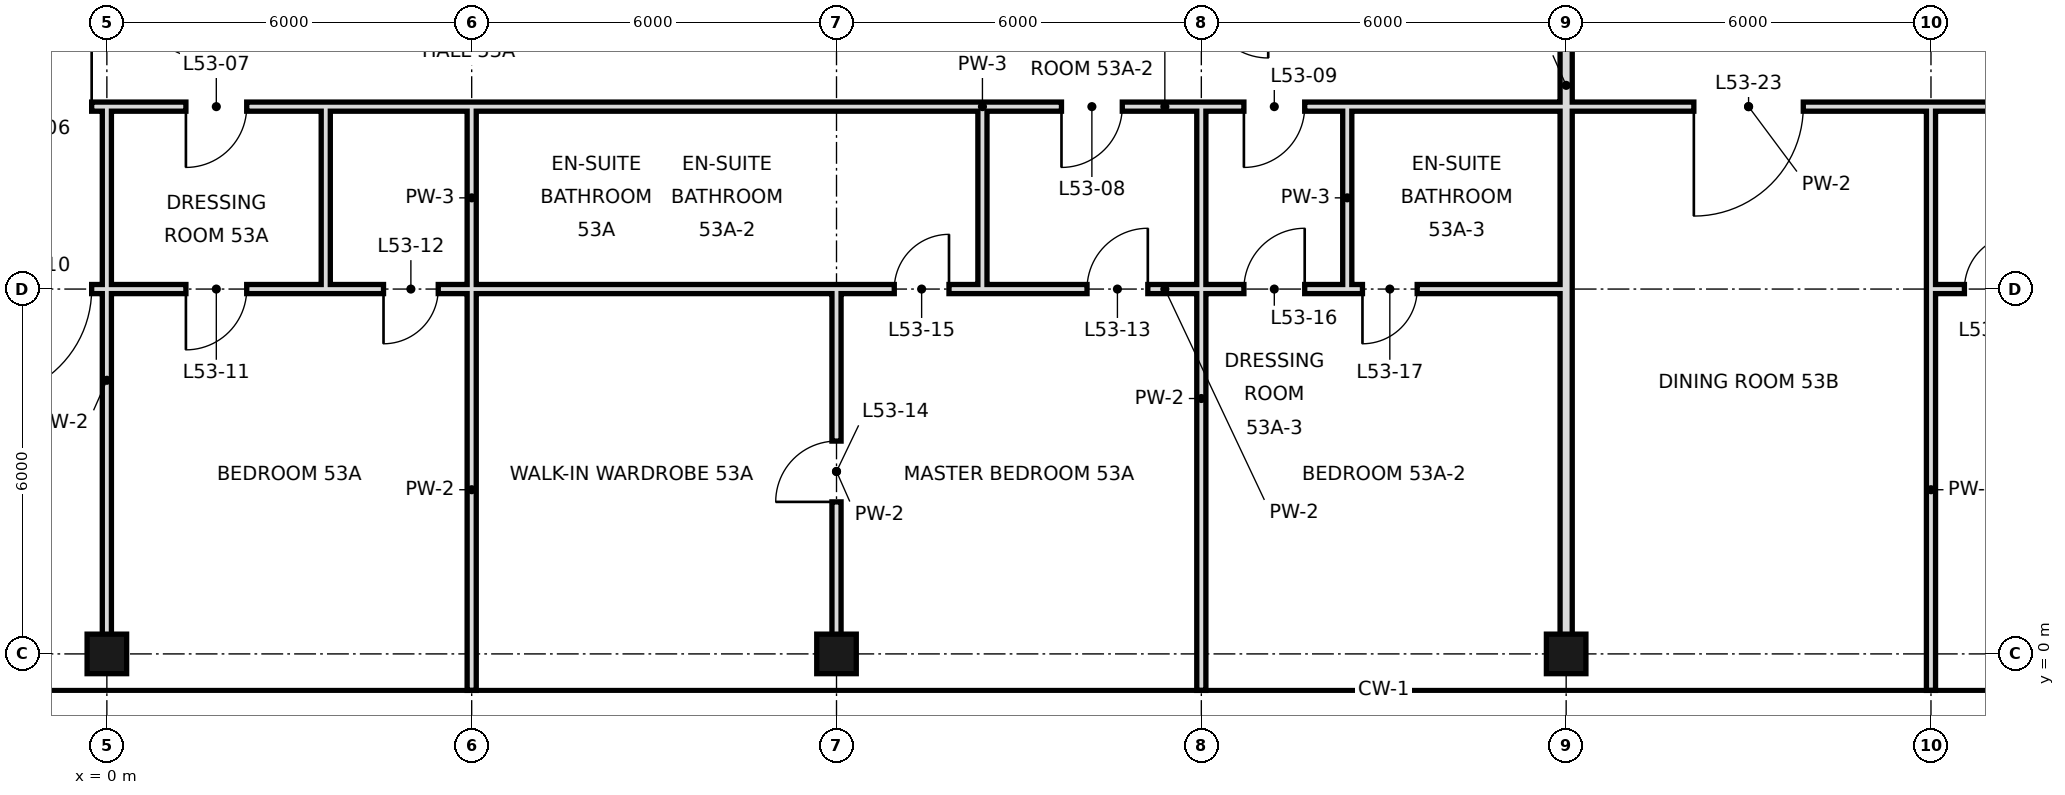
"""IFC4 building model, lengths in metres.
Left out: names, types, materials, properties, quantities, classifications, styles, units other than length and angle.
Written with IfcOpenShell. Run it as: python <this file> out.ifc"""

import sys

from ifc_helpers import new_model, si_unit, direction, frame, frame_2d, origin, origin_2d, place, context, subcontext, project, spatial, rectangle, hollow_rectangle, extrude, element, fill, save


model = new_model("IFC4")
c1 = context("Model", 3, precision=1e-05, world=origin(), true_north=direction((0.0, 1.0)))
c2 = subcontext(c1, "Body", "Model", "MODEL_VIEW")
j1 = project(units=[si_unit("LENGTHUNIT", "METRE"), si_unit("PLANEANGLEUNIT", "RADIAN")], contexts=[c1])
p1 = place(None, origin())
s1 = spatial("IfcSite", under=j1, at=p1, CompositionType="ELEMENT")
p2 = place(p1, origin())
s2 = spatial("IfcBuilding", under=s1, at=p2, CompositionType="ELEMENT")
p3 = place(p2, frame((0.0, 0.0, 226.2)))
s3 = spatial("IfcBuildingStorey", under=s2, at=p3, CompositionType="ELEMENT", Elevation=226.2)
for number, where, z_axis, x_axis in (
    (1, (0.0, 0.0, 0.0), (0.0, 0.0, 1.0), (1.0, 0.0, 0.0)),
    (2, (12.0, 0.0, 0.0), (0.0, 0.0, 1.0), (1.0, 0.0, 0.0)),
    (3, (24.0, 0.0, 0.0), (0.0, 0.0, 1.0), (1.0, 0.0, 0.0)),
):
    element("IfcColumn", number, at=place(p3, frame(where, z_axis=z_axis, x_axis=x_axis)), inside=s3, PredefinedType="COLUMN", context=c2, shape_type="SweptSolid", body=[
        extrude(hollow_rectangle(XDim=0.65, YDim=0.65, WallThickness=0.032, at=origin_2d()), origin(), (0.0, 0.0, 1.0), 3.6),
    ])
p4 = place(p3, frame((0.0, 0.0, 0.0), z_axis=(0.0, 0.0, 1.0), x_axis=(0.0, 1.0, 0.0)))
e4 = element("IfcWall", 4, at=p4, inside=s3, PredefinedType="PARTITIONING", context=c2, shape_type="SweptSolid", body=[
    extrude(rectangle(XDim=9.0, YDim=0.15, at=frame_2d((4.5, 0.0))), origin(), (0.0, 0.0, 1.0), 2.72),
])
p5 = place(p3, frame((12.0, 0.0, 0.0), z_axis=(0.0, 0.0, 1.0), x_axis=(0.0, 1.0, 0.0)))
e5 = element("IfcWall", 5, at=p5, inside=s3, PredefinedType="PARTITIONING", context=c2, shape_type="SweptSolid", body=[
    extrude(rectangle(XDim=6.0, YDim=0.15, at=frame_2d((3.0, 0.0))), origin(), (0.0, 0.0, 1.0), 2.72),
])
p6 = place(p5, frame((2.5, 0.0, 0.0)))
e6 = element("IfcOpeningElement", 6, at=p6, cuts=e5, PredefinedType="OPENING", context=c2, shape_type="SweptSolid", body=[
    extrude(rectangle(XDim=1.0, YDim=2.4, at=frame_2d((0.5, 1.2))), frame((0.0, 0.085, 0.0), z_axis=(0.0, -1.0, 0.0), x_axis=(1.0, 0.0, 0.0)), (0.0, 0.0, 1.0), 0.17),
])
p7 = place(p3, frame((14.4, 6.0, 0.0), z_axis=(0.0, 0.0, 1.0), x_axis=(0.0, 1.0, 0.0)))
e7 = element("IfcWall", 7, at=p7, inside=s3, PredefinedType="PARTITIONING", context=c2, shape_type="SweptSolid", body=[
    extrude(rectangle(XDim=3.0, YDim=0.15, at=frame_2d((1.5, 0.0))), origin(), (0.0, 0.0, 1.0), 3.42),
])
p8 = place(p3, frame((18.0, -0.6, 0.0), z_axis=(0.0, 0.0, 1.0), x_axis=(0.0, 1.0, 0.0)))
e8 = element("IfcWall", 8, at=p8, inside=s3, PredefinedType="PARTITIONING", context=c2, shape_type="SweptSolid", body=[
    extrude(rectangle(XDim=9.6, YDim=0.15, at=frame_2d((4.8, 0.0))), origin(), (0.0, 0.0, 1.0), 2.72),
])
p9 = place(p3, frame((20.4, 6.0, 0.0), z_axis=(0.0, 0.0, 1.0), x_axis=(0.0, 1.0, 0.0)))
e9 = element("IfcWall", 9, at=p9, inside=s3, PredefinedType="PARTITIONING", context=c2, shape_type="SweptSolid", body=[
    extrude(rectangle(XDim=3.0, YDim=0.15, at=frame_2d((1.5, 0.0))), origin(), (0.0, 0.0, 1.0), 3.42),
])
p10 = place(p3, frame((24.0, 0.0, 0.0), z_axis=(0.0, 0.0, 1.0), x_axis=(0.0, 1.0, 0.0)))
e10 = element("IfcWall", 10, at=p10, inside=s3, PredefinedType="SOLIDWALL", context=c2, shape_type="SweptSolid", body=[
    extrude(rectangle(XDim=18.7, YDim=0.2, at=frame_2d((9.35, 0.0))), origin(), (0.0, 0.0, 1.0), 2.72),
])
p11 = place(p3, frame((3.6, 6.0, 0.0), z_axis=(0.0, 0.0, 1.0), x_axis=(0.0, 1.0, 0.0)))
e11 = element("IfcWall", 11, at=p11, inside=s3, PredefinedType="PARTITIONING", context=c2, shape_type="SweptSolid", body=[
    extrude(rectangle(XDim=3.0, YDim=0.15, at=frame_2d((1.5, 0.0))), origin(), (0.0, 0.0, 1.0), 3.42),
])
p12 = place(p3, frame((30.0, -0.6, 0.0), z_axis=(0.0, 0.0, 1.0), x_axis=(0.0, 1.0, 0.0)))
e12 = element("IfcWall", 12, at=p12, inside=s3, PredefinedType="PARTITIONING", context=c2, shape_type="SweptSolid", body=[
    extrude(rectangle(XDim=6.6, YDim=0.15, at=frame_2d((3.3, 0.0))), origin(), (0.0, 0.0, 1.0), 2.72),
])
p13 = place(p3, frame((30.0, 6.0, 0.0), z_axis=(0.0, 0.0, 1.0), x_axis=(0.0, 1.0, 0.0)))
e13 = element("IfcWall", 13, at=p13, inside=s3, PredefinedType="PARTITIONING", context=c2, shape_type="SweptSolid", body=[
    extrude(rectangle(XDim=3.0, YDim=0.15, at=frame_2d((1.5, 0.0))), origin(), (0.0, 0.0, 1.0), 2.72),
])
p14 = place(p3, frame((6.0, -0.6, 0.0), z_axis=(0.0, 0.0, 1.0), x_axis=(0.0, 1.0, 0.0)))
e14 = element("IfcWall", 14, at=p14, inside=s3, PredefinedType="PARTITIONING", context=c2, shape_type="SweptSolid", body=[
    extrude(rectangle(XDim=6.6, YDim=0.15, at=frame_2d((3.3, 0.0))), origin(), (0.0, 0.0, 1.0), 2.72),
])
p15 = place(p3, frame((6.0, 6.0, 0.0), z_axis=(0.0, 0.0, 1.0), x_axis=(0.0, 1.0, 0.0)))
e15 = element("IfcWall", 15, at=p15, inside=s3, PredefinedType="PARTITIONING", context=c2, shape_type="SweptSolid", body=[
    extrude(rectangle(XDim=3.0, YDim=0.15, at=frame_2d((1.5, 0.0))), origin(), (0.0, 0.0, 1.0), 2.72),
])
p16 = place(p3, frame((-12.0, 6.0, 0.0), z_axis=(0.0, 0.0, 1.0), x_axis=(1.0, 0.0, 0.0)))
e16 = element("IfcWall", 16, at=p16, inside=s3, PredefinedType="PARTITIONING", context=c2, shape_type="SweptSolid", body=[
    extrude(rectangle(XDim=15.6, YDim=0.15, at=frame_2d((7.8, 0.0))), origin(), (0.0, 0.0, 1.0), 2.72),
])
p17 = place(p16, frame((9.95, 0.0, 0.0)))
e17 = element("IfcOpeningElement", 17, at=p17, cuts=e16, PredefinedType="OPENING", context=c2, shape_type="SweptSolid", body=[
    extrude(rectangle(XDim=1.8, YDim=2.4, at=frame_2d((0.9, 1.2))), frame((0.0, 0.085, 0.0), z_axis=(0.0, -1.0, 0.0), x_axis=(1.0, 0.0, 0.0)), (0.0, 0.0, 1.0), 0.17),
])
p18 = place(p16, frame((13.3, 0.0, 0.0)))
e18 = element("IfcOpeningElement", 18, at=p18, cuts=e16, PredefinedType="OPENING", context=c2, shape_type="SweptSolid", body=[
    extrude(rectangle(XDim=1.0, YDim=2.4, at=frame_2d((0.5, 1.2))), frame((0.0, 0.085, 0.0), z_axis=(0.0, -1.0, 0.0), x_axis=(1.0, 0.0, 0.0)), (0.0, 0.0, 1.0), 0.17),
])
p19 = place(p3, frame((14.4, 6.0, 0.0), z_axis=(0.0, 0.0, 1.0), x_axis=(1.0, 0.0, 0.0)))
e19 = element("IfcWall", 19, at=p19, inside=s3, PredefinedType="PARTITIONING", context=c2, shape_type="SweptSolid", body=[
    extrude(rectangle(XDim=6.0, YDim=0.15, at=frame_2d((3.0, 0.0))), origin(), (0.0, 0.0, 1.0), 2.97),
])
p20 = place(p19, frame((1.72, 0.0, 0.0)))
e20 = element("IfcOpeningElement", 20, at=p20, cuts=e19, PredefinedType="OPENING", context=c2, shape_type="SweptSolid", body=[
    extrude(rectangle(XDim=1.0, YDim=2.4, at=frame_2d((0.5, 1.2))), frame((0.0, 0.085, 0.0), z_axis=(0.0, -1.0, 0.0), x_axis=(1.0, 0.0, 0.0)), (0.0, 0.0, 1.0), 0.17),
])
p21 = place(p19, frame((4.3, 0.0, 0.0)))
e21 = element("IfcOpeningElement", 21, at=p21, cuts=e19, PredefinedType="OPENING", context=c2, shape_type="SweptSolid", body=[
    extrude(rectangle(XDim=1.0, YDim=2.4, at=frame_2d((0.5, 1.2))), frame((0.0, 0.085, 0.0), z_axis=(0.0, -1.0, 0.0), x_axis=(1.0, 0.0, 0.0)), (0.0, 0.0, 1.0), 0.17),
])
p22 = place(p3, frame((3.6, 6.0, 0.0), z_axis=(0.0, 0.0, 1.0), x_axis=(1.0, 0.0, 0.0)))
e22 = element("IfcWall", 22, at=p22, inside=s3, PredefinedType="PARTITIONING", context=c2, shape_type="SweptSolid", body=[
    extrude(rectangle(XDim=10.8, YDim=0.15, at=frame_2d((5.4, 0.0))), origin(), (0.0, 0.0, 1.0), 2.97),
])
p23 = place(p22, frame((0.95, 0.0, 0.0)))
e23 = element("IfcOpeningElement", 23, at=p23, cuts=e22, PredefinedType="OPENING", context=c2, shape_type="SweptSolid", body=[
    extrude(rectangle(XDim=0.9, YDim=2.4, at=frame_2d((0.45, 1.2))), frame((0.0, 0.085, 0.0), z_axis=(0.0, -1.0, 0.0), x_axis=(1.0, 0.0, 0.0)), (0.0, 0.0, 1.0), 0.17),
])
p24 = place(p22, frame((9.35, 0.0, 0.0)))
e24 = element("IfcOpeningElement", 24, at=p24, cuts=e22, PredefinedType="OPENING", context=c2, shape_type="SweptSolid", body=[
    extrude(rectangle(XDim=0.9, YDim=2.4, at=frame_2d((0.45, 1.2))), frame((0.0, 0.085, 0.0), z_axis=(0.0, -1.0, 0.0), x_axis=(1.0, 0.0, 0.0)), (0.0, 0.0, 1.0), 0.17),
])
p25 = place(p3, frame((20.4, 6.0, 0.0), z_axis=(0.0, 0.0, 1.0), x_axis=(1.0, 0.0, 0.0)))
e25 = element("IfcWall", 25, at=p25, inside=s3, PredefinedType="PARTITIONING", context=c2, shape_type="SweptSolid", body=[
    extrude(rectangle(XDim=3.6, YDim=0.15, at=frame_2d((1.8, 0.0))), origin(), (0.0, 0.0, 1.0), 2.97),
])
p26 = place(p25, frame((0.25, 0.0, 0.0)))
e26 = element("IfcOpeningElement", 26, at=p26, cuts=e25, PredefinedType="OPENING", context=c2, shape_type="SweptSolid", body=[
    extrude(rectangle(XDim=0.9, YDim=2.4, at=frame_2d((0.45, 1.2))), frame((0.0, 0.085, 0.0), z_axis=(0.0, -1.0, 0.0), x_axis=(1.0, 0.0, 0.0)), (0.0, 0.0, 1.0), 0.17),
])
p27 = place(p3, frame((30.0, 6.0, 0.0), z_axis=(0.0, 0.0, 1.0), x_axis=(1.0, 0.0, 0.0)))
e27 = element("IfcWall", 27, at=p27, inside=s3, PredefinedType="PARTITIONING", context=c2, shape_type="SweptSolid", body=[
    extrude(rectangle(XDim=2.4, YDim=0.15, at=frame_2d((1.2, 0.0))), origin(), (0.0, 0.0, 1.0), 2.97),
])
p28 = place(p27, frame((0.55, 0.0, 0.0)))
e28 = element("IfcOpeningElement", 28, at=p28, cuts=e27, PredefinedType="OPENING", context=c2, shape_type="SweptSolid", body=[
    extrude(rectangle(XDim=0.9, YDim=2.4, at=frame_2d((0.45, 1.2))), frame((0.0, 0.085, 0.0), z_axis=(0.0, -1.0, 0.0), x_axis=(1.0, 0.0, 0.0)), (0.0, 0.0, 1.0), 0.17),
])
p29 = place(p3, frame((-12.6, 9.0, 0.0), z_axis=(0.0, 0.0, 1.0), x_axis=(1.0, 0.0, 0.0)))
e29 = element("IfcWall", 29, at=p29, inside=s3, PredefinedType="PARTITIONING", context=c2, shape_type="SweptSolid", body=[
    extrude(rectangle(XDim=16.2, YDim=0.15, at=frame_2d((8.1, 0.0))), origin(), (0.0, 0.0, 1.0), 3.42),
])
p30 = place(p29, frame((10.55, 0.0, 0.0)))
e30 = element("IfcOpeningElement", 30, at=p30, cuts=e29, PredefinedType="OPENING", context=c2, shape_type="SweptSolid", body=[
    extrude(rectangle(XDim=1.8, YDim=2.4, at=frame_2d((0.9, 1.2))), frame((0.0, 0.085, 0.0), z_axis=(0.0, -1.0, 0.0), x_axis=(1.0, 0.0, 0.0)), (0.0, 0.0, 1.0), 0.17),
])
p31 = place(p29, frame((13.9, 0.0, 0.0)))
e31 = element("IfcOpeningElement", 31, at=p31, cuts=e29, PredefinedType="OPENING", context=c2, shape_type="SweptSolid", body=[
    extrude(rectangle(XDim=1.0, YDim=2.4, at=frame_2d((0.5, 1.2))), frame((0.0, 0.085, 0.0), z_axis=(0.0, -1.0, 0.0), x_axis=(1.0, 0.0, 0.0)), (0.0, 0.0, 1.0), 0.17),
])
p32 = place(p3, frame((14.4, 9.0, 0.0), z_axis=(0.0, 0.0, 1.0), x_axis=(1.0, 0.0, 0.0)))
e32 = element("IfcWall", 32, at=p32, inside=s3, PredefinedType="PARTITIONING", context=c2, shape_type="SweptSolid", body=[
    extrude(rectangle(XDim=6.0, YDim=0.15, at=frame_2d((3.0, 0.0))), origin(), (0.0, 0.0, 1.0), 3.42),
])
p33 = place(p32, frame((1.3, 0.0, 0.0)))
e33 = element("IfcOpeningElement", 33, at=p33, cuts=e32, PredefinedType="OPENING", context=c2, shape_type="SweptSolid", body=[
    extrude(rectangle(XDim=1.0, YDim=2.4, at=frame_2d((0.5, 1.2))), frame((0.0, 0.085, 0.0), z_axis=(0.0, -1.0, 0.0), x_axis=(1.0, 0.0, 0.0)), (0.0, 0.0, 1.0), 0.17),
])
p34 = place(p32, frame((4.3, 0.0, 0.0)))
e34 = element("IfcOpeningElement", 34, at=p34, cuts=e32, PredefinedType="OPENING", context=c2, shape_type="SweptSolid", body=[
    extrude(rectangle(XDim=1.0, YDim=2.4, at=frame_2d((0.5, 1.2))), frame((0.0, 0.085, 0.0), z_axis=(0.0, -1.0, 0.0), x_axis=(1.0, 0.0, 0.0)), (0.0, 0.0, 1.0), 0.17),
])
p35 = place(p3, frame((24.0, 9.0, 0.0), z_axis=(0.0, 0.0, 1.0), x_axis=(1.0, 0.0, 0.0)))
e35 = element("IfcWall", 35, at=p35, inside=s3, PredefinedType="PARTITIONING", context=c2, shape_type="SweptSolid", body=[
    extrude(rectangle(XDim=6.0, YDim=0.15, at=frame_2d((3.0, 0.0))), origin(), (0.0, 0.0, 1.0), 3.42),
])
p36 = place(p35, frame((2.1, 0.0, 0.0)))
e36 = element("IfcOpeningElement", 36, at=p36, cuts=e35, PredefinedType="OPENING", context=c2, shape_type="SweptSolid", body=[
    extrude(rectangle(XDim=1.8, YDim=2.4, at=frame_2d((0.9, 1.2))), frame((0.0, 0.085, 0.0), z_axis=(0.0, -1.0, 0.0), x_axis=(1.0, 0.0, 0.0)), (0.0, 0.0, 1.0), 0.17),
])
p37 = place(p3, frame((3.6, 9.0, 0.0), z_axis=(0.0, 0.0, 1.0), x_axis=(1.0, 0.0, 0.0)))
e37 = element("IfcWall", 37, at=p37, inside=s3, PredefinedType="PARTITIONING", context=c2, shape_type="SweptSolid", body=[
    extrude(rectangle(XDim=10.8, YDim=0.15, at=frame_2d((5.4, 0.0))), origin(), (0.0, 0.0, 1.0), 3.42),
])
p38 = place(p3, frame((20.4, 9.0, 0.0), z_axis=(0.0, 0.0, 1.0), x_axis=(1.0, 0.0, 0.0)))
e38 = element("IfcWall", 38, at=p38, inside=s3, PredefinedType="PARTITIONING", context=c2, shape_type="SweptSolid", body=[
    extrude(rectangle(XDim=3.6, YDim=0.15, at=frame_2d((1.8, 0.0))), origin(), (0.0, 0.0, 1.0), 3.42),
])
p39 = place(p3, frame((30.0, 9.0, 0.0), z_axis=(0.0, 0.0, 1.0), x_axis=(1.0, 0.0, 0.0)))
e39 = element("IfcWall", 39, at=p39, inside=s3, PredefinedType="PARTITIONING", context=c2, shape_type="SweptSolid", body=[
    extrude(rectangle(XDim=2.4, YDim=0.15, at=frame_2d((1.2, 0.0))), origin(), (0.0, 0.0, 1.0), 3.42),
])
p40 = place(p30, frame((1.8, 0.0, 0.0), z_axis=(0.0, 0.0, 1.0), x_axis=(-1.0, 0.0, 0.0)))
e40 = element("IfcDoor", 40, at=p40, inside=s3, OperationType="SINGLE_SWING_LEFT", PredefinedType="DOOR", context=c2, shape_type="SweptSolid", body=[
    extrude(rectangle(XDim=1.8, YDim=2.4, at=frame_2d((0.9, 1.2))), frame((0.0, 0.025, 0.0), z_axis=(0.0, -1.0, 0.0), x_axis=(1.0, 0.0, 0.0)), (0.0, 0.0, 1.0), 0.05),
])
fill(e30, e40)
p41 = place(p31, frame((1.0, 0.0, 0.0), z_axis=(0.0, 0.0, 1.0), x_axis=(-1.0, 0.0, 0.0)))
e41 = element("IfcDoor", 41, at=p41, inside=s3, OperationType="SINGLE_SWING_RIGHT", PredefinedType="DOOR", context=c2, shape_type="SweptSolid", body=[
    extrude(rectangle(XDim=1.0, YDim=2.4, at=frame_2d((0.5, 1.2))), frame((0.0, 0.025, 0.0), z_axis=(0.0, -1.0, 0.0), x_axis=(1.0, 0.0, 0.0)), (0.0, 0.0, 1.0), 0.05),
])
fill(e31, e41)
p42 = place(p33, frame((1.0, 0.0, 0.0), z_axis=(0.0, 0.0, 1.0), x_axis=(-1.0, 0.0, 0.0)))
e42 = element("IfcDoor", 42, at=p42, inside=s3, OperationType="SINGLE_SWING_RIGHT", PredefinedType="DOOR", context=c2, shape_type="SweptSolid", body=[
    extrude(rectangle(XDim=1.0, YDim=2.4, at=frame_2d((0.5, 1.2))), frame((0.0, 0.025, 0.0), z_axis=(0.0, -1.0, 0.0), x_axis=(1.0, 0.0, 0.0)), (0.0, 0.0, 1.0), 0.05),
])
fill(e33, e42)
p43 = place(p34, frame((1.0, 0.0, 0.0), z_axis=(0.0, 0.0, 1.0), x_axis=(-1.0, 0.0, 0.0)))
e43 = element("IfcDoor", 43, at=p43, inside=s3, OperationType="SINGLE_SWING_RIGHT", PredefinedType="DOOR", context=c2, shape_type="SweptSolid", body=[
    extrude(rectangle(XDim=1.0, YDim=2.4, at=frame_2d((0.5, 1.2))), frame((0.0, 0.025, 0.0), z_axis=(0.0, -1.0, 0.0), x_axis=(1.0, 0.0, 0.0)), (0.0, 0.0, 1.0), 0.05),
])
fill(e34, e43)
p44 = place(p17, frame((1.8, 0.0, 0.0), z_axis=(0.0, 0.0, 1.0), x_axis=(-1.0, 0.0, 0.0)))
e44 = element("IfcDoor", 44, at=p44, inside=s3, OperationType="SINGLE_SWING_RIGHT", PredefinedType="DOOR", context=c2, shape_type="SweptSolid", body=[
    extrude(rectangle(XDim=1.8, YDim=2.4, at=frame_2d((0.9, 1.2))), frame((0.0, 0.025, 0.0), z_axis=(0.0, -1.0, 0.0), x_axis=(1.0, 0.0, 0.0)), (0.0, 0.0, 1.0), 0.05),
])
fill(e17, e44)
p45 = place(p18, frame((1.0, 0.0, 0.0), z_axis=(0.0, 0.0, 1.0), x_axis=(-1.0, 0.0, 0.0)))
e45 = element("IfcDoor", 45, at=p45, inside=s3, OperationType="SINGLE_SWING_RIGHT", PredefinedType="DOOR", context=c2, shape_type="SweptSolid", body=[
    extrude(rectangle(XDim=1.0, YDim=2.4, at=frame_2d((0.5, 1.2))), frame((0.0, 0.025, 0.0), z_axis=(0.0, -1.0, 0.0), x_axis=(1.0, 0.0, 0.0)), (0.0, 0.0, 1.0), 0.05),
])
fill(e18, e45)
p46 = place(p23, frame((0.9, 0.0, 0.0), z_axis=(0.0, 0.0, 1.0), x_axis=(-1.0, 0.0, 0.0)))
e46 = element("IfcDoor", 46, at=p46, inside=s3, OperationType="SINGLE_SWING_RIGHT", PredefinedType="DOOR", context=c2, shape_type="SweptSolid", body=[
    extrude(rectangle(XDim=0.9, YDim=2.4, at=frame_2d((0.45, 1.2))), frame((0.0, 0.025, 0.0), z_axis=(0.0, -1.0, 0.0), x_axis=(1.0, 0.0, 0.0)), (0.0, 0.0, 1.0), 0.05),
])
fill(e23, e46)
p47 = place(p20, frame((1.0, 0.0, 0.0), z_axis=(0.0, 0.0, 1.0), x_axis=(-1.0, 0.0, 0.0)))
e47 = element("IfcDoor", 47, at=p47, inside=s3, OperationType="SINGLE_SWING_LEFT", PredefinedType="DOOR", context=c2, shape_type="SweptSolid", body=[
    extrude(rectangle(XDim=1.0, YDim=2.4, at=frame_2d((0.5, 1.2))), frame((0.0, 0.025, 0.0), z_axis=(0.0, -1.0, 0.0), x_axis=(1.0, 0.0, 0.0)), (0.0, 0.0, 1.0), 0.05),
])
fill(e20, e47)
p48 = place(p6, origin())
e48 = element("IfcDoor", 48, at=p48, inside=s3, OperationType="SINGLE_SWING_LEFT", PredefinedType="DOOR", context=c2, shape_type="SweptSolid", body=[
    extrude(rectangle(XDim=1.0, YDim=2.4, at=frame_2d((0.5, 1.2))), frame((0.0, 0.025, 0.0), z_axis=(0.0, -1.0, 0.0), x_axis=(1.0, 0.0, 0.0)), (0.0, 0.0, 1.0), 0.05),
])
fill(e6, e48)
p49 = place(p24, frame((0.9, 0.0, 0.0), z_axis=(0.0, 0.0, 1.0), x_axis=(-1.0, 0.0, 0.0)))
e49 = element("IfcDoor", 49, at=p49, inside=s3, OperationType="SINGLE_SWING_LEFT", PredefinedType="DOOR", context=c2, shape_type="SweptSolid", body=[
    extrude(rectangle(XDim=0.9, YDim=2.4, at=frame_2d((0.45, 1.2))), frame((0.0, 0.025, 0.0), z_axis=(0.0, -1.0, 0.0), x_axis=(1.0, 0.0, 0.0)), (0.0, 0.0, 1.0), 0.05),
])
fill(e24, e49)
p50 = place(p21, frame((1.0, 0.0, 0.0), z_axis=(0.0, 0.0, 1.0), x_axis=(-1.0, 0.0, 0.0)))
e50 = element("IfcDoor", 50, at=p50, inside=s3, OperationType="SINGLE_SWING_LEFT", PredefinedType="DOOR", context=c2, shape_type="SweptSolid", body=[
    extrude(rectangle(XDim=1.0, YDim=2.4, at=frame_2d((0.5, 1.2))), frame((0.0, 0.025, 0.0), z_axis=(0.0, -1.0, 0.0), x_axis=(1.0, 0.0, 0.0)), (0.0, 0.0, 1.0), 0.05),
])
fill(e21, e50)
p51 = place(p26, frame((0.9, 0.0, 0.0), z_axis=(0.0, 0.0, 1.0), x_axis=(-1.0, 0.0, 0.0)))
e51 = element("IfcDoor", 51, at=p51, inside=s3, OperationType="SINGLE_SWING_RIGHT", PredefinedType="DOOR", context=c2, shape_type="SweptSolid", body=[
    extrude(rectangle(XDim=0.9, YDim=2.4, at=frame_2d((0.45, 1.2))), frame((0.0, 0.025, 0.0), z_axis=(0.0, -1.0, 0.0), x_axis=(1.0, 0.0, 0.0)), (0.0, 0.0, 1.0), 0.05),
])
fill(e26, e51)
p52 = place(p36, frame((1.8, 0.0, 0.0), z_axis=(0.0, 0.0, 1.0), x_axis=(-1.0, 0.0, 0.0)))
e52 = element("IfcDoor", 52, at=p52, inside=s3, OperationType="SINGLE_SWING_RIGHT", PredefinedType="DOOR", context=c2, shape_type="SweptSolid", body=[
    extrude(rectangle(XDim=1.8, YDim=2.4, at=frame_2d((0.9, 1.2))), frame((0.0, 0.025, 0.0), z_axis=(0.0, -1.0, 0.0), x_axis=(1.0, 0.0, 0.0)), (0.0, 0.0, 1.0), 0.05),
])
fill(e36, e52)
p53 = place(p28, frame((0.9, 0.0, 0.0), z_axis=(0.0, 0.0, 1.0), x_axis=(-1.0, 0.0, 0.0)))
e53 = element("IfcDoor", 53, at=p53, inside=s3, OperationType="SINGLE_SWING_LEFT", PredefinedType="DOOR", context=c2, shape_type="SweptSolid", body=[
    extrude(rectangle(XDim=0.9, YDim=2.4, at=frame_2d((0.45, 1.2))), frame((0.0, 0.025, 0.0), z_axis=(0.0, -1.0, 0.0), x_axis=(1.0, 0.0, 0.0)), (0.0, 0.0, 1.0), 0.05),
])
fill(e28, e53)
save(model, sys.argv[1])
